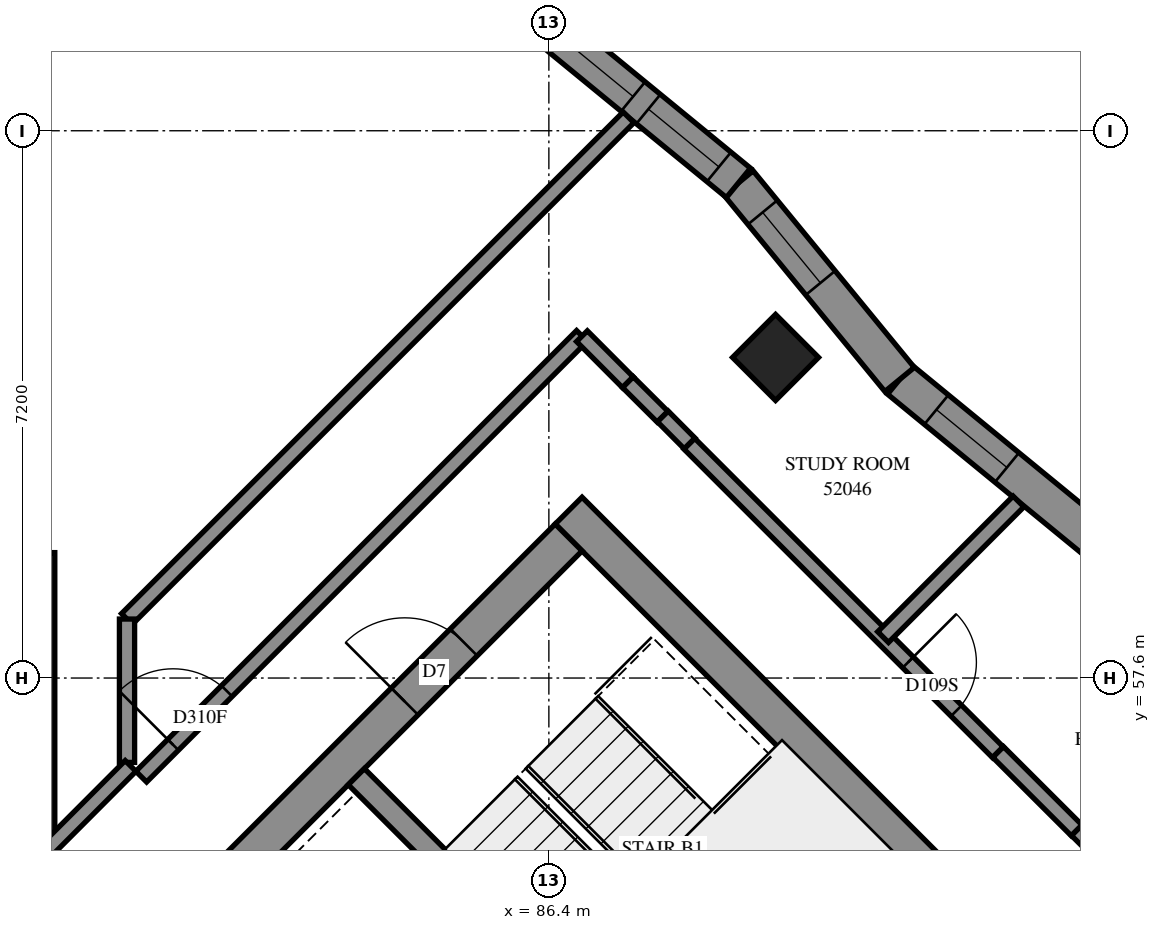
"""IFC4 building model, lengths in metres.
Left out: names, types, materials, properties, quantities, classifications, styles, units other than length and angle.
Written with IfcOpenShell. Run it as: python <this file> out.ifc"""

import sys

from ifc_helpers import new_model, si_unit, direction, frame, frame_2d, origin, origin_2d, place, context, subcontext, project, spatial, polyline, rectangle, outline, extrude, element, fill, save


model = new_model("IFC4")
c1 = context("Model", 3, precision=1e-05, world=origin(), true_north=direction((0.0, 1.0)))
c2 = subcontext(c1, "Body", "Model", "MODEL_VIEW")
j1 = project(units=[si_unit("LENGTHUNIT", "METRE"), si_unit("PLANEANGLEUNIT", "RADIAN")], contexts=[c1])
p1 = place(None, origin())
s1 = spatial("IfcSite", under=j1, at=p1, CompositionType="ELEMENT")
p2 = place(p1, origin())
s2 = spatial("IfcBuilding", under=s1, at=p2, CompositionType="ELEMENT")
p3 = place(p2, frame((0.0, 0.0, 193.0)))
s3 = spatial("IfcBuildingStorey", under=s2, at=p3, CompositionType="ELEMENT", Elevation=193.0)
p4 = place(p3, frame((89.382, 61.818, 0.0), z_axis=(0.0, 0.0, 1.0), x_axis=(0.7071067812, -0.7071067812, 0.0)))
e1 = element("IfcColumn", 1, at=p4, inside=s3, PredefinedType="COLUMN", context=c2, shape_type="SweptSolid", body=[
    extrude(rectangle(XDim=0.8, YDim=0.8, at=origin_2d()), origin(), (0.0, 0.0, 1.0), 3.1),
])
p5 = place(p3, frame((86.66, 59.802, -0.3), z_axis=(0.0, 0.0, 1.0), x_axis=(0.7071067812, -0.7071067812, 0.0)))
e2 = element("IfcWall", 2, at=p5, inside=s3, PredefinedType="SHEAR", context=c2, shape_type="SweptSolid", body=[
    extrude(rectangle(XDim=15.4, YDim=0.5, at=frame_2d((7.7, 0.0))), origin(), (0.0, 0.0, 1.0), 2.7),
])
p6 = place(p5, frame((10.5, 0.0, 0.3)))
e3 = element("IfcOpeningElement", 3, at=p6, cuts=e2, PredefinedType="OPENING", context=c2, shape_type="SweptSolid", body=[
    extrude(rectangle(XDim=0.8, YDim=2.1, at=frame_2d((0.4, 1.05))), frame((0.0, 0.26, 0.0), z_axis=(0.0, -1.0, 0.0), x_axis=(1.0, 0.0, 0.0)), (0.0, 0.0, 1.0), 0.52),
])
p7 = place(p3, frame((76.478, 49.267, -0.3), z_axis=(0.0, 0.0, 1.0), x_axis=(0.7071067812, 0.7071067812, 0.0)))
e4 = element("IfcWall", 4, at=p7, inside=s3, PredefinedType="SHEAR", context=c2, shape_type="SweptSolid", body=[
    extrude(rectangle(XDim=14.4, YDim=0.5, at=frame_2d((7.2, 0.0))), origin(), (0.0, 0.0, 1.0), 2.7),
])
p8 = place(p7, frame((4.55, 0.0, 0.3)))
e5 = element("IfcOpeningElement", 5, at=p8, cuts=e4, PredefinedType="OPENING", context=c2, shape_type="SweptSolid", body=[
    extrude(rectangle(XDim=1.1, YDim=2.1, at=frame_2d((0.55, 1.05))), frame((0.0, 0.26, 0.0), z_axis=(0.0, -1.0, 0.0), x_axis=(1.0, 0.0, 0.0)), (0.0, 0.0, 1.0), 0.52),
])
p9 = place(p7, frame((11.35, 0.0, 0.3)))
e6 = element("IfcOpeningElement", 6, at=p9, cuts=e4, PredefinedType="OPENING", context=c2, shape_type="SweptSolid", body=[
    extrude(rectangle(XDim=1.1, YDim=2.1, at=frame_2d((0.55, 1.05))), frame((0.0, 0.26, 0.0), z_axis=(0.0, -1.0, 0.0), x_axis=(1.0, 0.0, 0.0)), (0.0, 0.0, 1.0), 0.52),
])
p10 = place(p3, frame((83.867, 56.302, 0.0), z_axis=(0.0, 0.0, 1.0), x_axis=(0.7071137256, -0.7070998367, 0.0)))
e7 = element("IfcWall", 7, at=p10, inside=s3, PredefinedType="SOLIDWALL", context=c2, shape_type="SweptSolid", body=[
    extrude(rectangle(XDim=7.2, YDim=0.3, at=frame_2d((3.6, 0.0))), origin(), (0.0, 0.0, 1.0), 3.1),
])
p11 = place(p3, frame((93.601, 59.408, 0.0), z_axis=(0.0, 0.0, 1.0), x_axis=(-0.7734255065, 0.6338872028, 0.0)))
e8 = element("IfcWall", 8, at=p11, inside=s3, PredefinedType="SOLIDWALL", context=c2, shape_type="SweptSolid", body=[
    extrude(outline(polyline([(-0.025, -0.25), (3.32, -0.25), (3.369, 0.25), (0.025, 0.25), (-0.025, -0.25)])), origin(), (0.0, 0.0, 1.0), 3.1),
])
p12 = place(p11, frame((1.518, 0.0, 0.45)))
e9 = element("IfcOpeningElement", 9, at=p12, cuts=e8, PredefinedType="OPENING", context=c2, shape_type="SweptSolid", body=[
    extrude(rectangle(XDim=1.2, YDim=2.5, at=frame_2d((0.6, 1.25))), frame((0.0, 0.26, 0.0), z_axis=(0.0, -1.0, 0.0), x_axis=(1.0, 0.0, 0.0)), (0.0, 0.0, 1.0), 0.52),
])
p13 = place(p3, frame((91.014, 61.528, 0.0), z_axis=(0.0, 0.0, 1.0), x_axis=(-0.6338872028, 0.7734255065, 0.0)))
e10 = element("IfcWall", 10, at=p13, inside=s3, PredefinedType="SOLIDWALL", context=c2, shape_type="SweptSolid", body=[
    extrude(outline(polyline([(0.025, -0.25), (3.369, -0.25), (3.32, 0.25), (-0.025, 0.25), (0.025, -0.25)])), origin(), (0.0, 0.0, 1.0), 3.1),
])
p14 = place(p13, frame((1.643, 0.0, 0.45)))
e11 = element("IfcOpeningElement", 11, at=p14, cuts=e10, PredefinedType="OPENING", context=c2, shape_type="SweptSolid", body=[
    extrude(rectangle(XDim=1.2, YDim=2.5, at=frame_2d((0.6, 1.25))), frame((0.0, 0.26, 0.0), z_axis=(0.0, -1.0, 0.0), x_axis=(1.0, 0.0, 0.0)), (0.0, 0.0, 1.0), 0.52),
])
p15 = place(p3, frame((88.894, 64.115, 0.0), z_axis=(0.0, 0.0, 1.0), x_axis=(-0.7734281512, 0.6338839759, 0.0)))
e12 = element("IfcWall", 12, at=p15, inside=s3, PredefinedType="SOLIDWALL", context=c2, shape_type="SweptSolid", body=[
    extrude(outline(polyline([(-0.025, -0.25), (3.32, -0.25), (3.369, 0.25), (0.025, 0.25), (-0.025, -0.25)])), origin(), (0.0, 0.0, 1.0), 3.1),
])
p16 = place(p15, frame((0.332, 0.0, 0.45)))
e13 = element("IfcOpeningElement", 13, at=p16, cuts=e12, PredefinedType="OPENING", context=c2, shape_type="SweptSolid", body=[
    extrude(rectangle(XDim=1.2, YDim=2.5, at=frame_2d((0.6, 1.25))), frame((0.0, 0.26, 0.0), z_axis=(0.0, -1.0, 0.0), x_axis=(1.0, 0.0, 0.0)), (0.0, 0.0, 1.0), 0.52),
])
p17 = place(p15, frame((1.792, 0.0, 0.45)))
e14 = element("IfcOpeningElement", 14, at=p17, cuts=e12, PredefinedType="OPENING", context=c2, shape_type="SweptSolid", body=[
    extrude(rectangle(XDim=1.2, YDim=2.5, at=frame_2d((0.6, 1.25))), frame((0.0, 0.26, 0.0), z_axis=(0.0, -1.0, 0.0), x_axis=(1.0, 0.0, 0.0)), (0.0, 0.0, 1.0), 0.52),
])
p18 = place(p3, frame((80.849, 58.377, 0.0), z_axis=(0.0, 0.0, 1.0), x_axis=(0.7071067812, 0.7071067812, 0.0)))
e15 = element("IfcWall", 15, at=p18, inside=s3, PredefinedType="PARTITIONING", context=c2, shape_type="SweptSolid", body=[
    extrude(rectangle(XDim=9.333, YDim=0.2, at=frame_2d((4.666, 0.0))), origin(), (0.0, 0.0, 1.0), 3.1),
])
p19 = place(p3, frame((93.346, 55.599, 0.0), z_axis=(0.0, 0.0, 1.0), x_axis=(0.7071067812, -0.7071067812, 0.0)))
e16 = element("IfcWall", 16, at=p19, inside=s3, PredefinedType="PARTITIONING", context=c2, shape_type="SweptSolid", body=[
    extrude(rectangle(XDim=9.201, YDim=0.2, at=frame_2d((4.601, 0.0))), origin(), (0.0, 0.0, 1.0), 3.1),
])
p20 = place(p3, frame((81.037, 56.303, 0.0), z_axis=(0.0, 0.0, 1.0), x_axis=(0.7071067812, 0.7071067812, 0.0)))
e17 = element("IfcWall", 17, at=p20, inside=s3, PredefinedType="PARTITIONING", context=c2, shape_type="SweptSolid", body=[
    extrude(rectangle(XDim=8.2, YDim=0.2, at=frame_2d((4.1, 0.0))), origin(), (0.0, 0.0, 1.0), 3.1),
])
p21 = place(p20, frame((0.592, 0.0, 0.0)))
e18 = element("IfcOpeningElement", 18, at=p21, cuts=e17, PredefinedType="OPENING", context=c2, shape_type="SweptSolid", body=[
    extrude(rectangle(XDim=1.0, YDim=2.1, at=frame_2d((0.5, 1.05))), frame((0.0, 0.11, 0.0), z_axis=(0.0, -1.0, 0.0), x_axis=(1.0, 0.0, 0.0)), (0.0, 0.0, 1.0), 0.22),
])
p22 = place(p3, frame((88.247, 60.683, 0.0), z_axis=(0.0, 0.0, 1.0), x_axis=(0.7071067812, -0.7071067812, 0.0)))
e19 = element("IfcWall", 19, at=p22, inside=s3, PredefinedType="PARTITIONING", context=c2, shape_type="SweptSolid", body=[
    extrude(rectangle(XDim=5.742, YDim=0.2, at=frame_2d((2.871, 0.0))), origin(), (0.0, 0.0, 1.0), 3.1),
])
p23 = place(p22, frame((4.069, 0.0, 0.0)))
e20 = element("IfcOpeningElement", 20, at=p23, cuts=e19, PredefinedType="OPENING", context=c2, shape_type="SweptSolid", body=[
    extrude(rectangle(XDim=0.9, YDim=2.1, at=frame_2d((0.45, 1.05))), frame((0.0, 0.11, 0.0), z_axis=(0.0, -1.0, 0.0), x_axis=(1.0, 0.0, 0.0)), (0.0, 0.0, 1.0), 0.22),
])
p24 = place(p3, frame((79.8, 55.35, 0.0), z_axis=(0.0, 0.0, 1.0), x_axis=(0.0, 1.0, 0.0)))
e21 = element("IfcWall", 21, at=p24, inside=s3, PredefinedType="PARTITIONING", context=c2, shape_type="SweptSolid", body=[
    extrude(rectangle(XDim=3.9, YDim=0.2, at=frame_2d((1.95, 0.0))), origin(), (0.0, 0.0, 1.0), 3.1),
])
p25 = place(p3, frame((90.797, 58.139, 0.0), z_axis=(0.0, 0.0, 1.0), x_axis=(0.7066702589, 0.7075430342, 0.0)))
e22 = element("IfcWall", 22, at=p25, inside=s3, PredefinedType="PARTITIONING", context=c2, shape_type="SweptSolid", body=[
    extrude(rectangle(XDim=2.521, YDim=0.2, at=frame_2d((1.26, 0.0))), origin(), (0.0, 0.0, 1.0), 3.1),
])
p26 = place(p3, frame((80.85, 56.49, 0.0), z_axis=(0.0, 0.0, 1.0), x_axis=(0.0, 1.0, 0.0)))
e23 = element("IfcWall", 23, at=p26, inside=s3, PredefinedType="PARTITIONING", context=c2, shape_type="SweptSolid", body=[
    extrude(rectangle(XDim=1.886, YDim=0.2, at=frame_2d((0.943, 0.0))), origin(), (0.0, 0.0, 1.0), 3.1),
])
p27 = place(p3, frame((79.803, 55.347, 0.0), z_axis=(0.0, 0.0, 1.0), x_axis=(0.706460727, 0.7077522457, 0.0)))
e24 = element("IfcWall", 24, at=p27, inside=s3, PredefinedType="PARTITIONING", context=c2, shape_type="SweptSolid", body=[
    extrude(rectangle(XDim=1.549, YDim=0.2, at=frame_2d((0.774, 0.0))), origin(), (0.0, 0.0, 1.0), 3.1),
])
p28 = place(p3, frame((92.311, 56.627, 0.0), z_axis=(0.0, 0.0, 1.0), x_axis=(0.7077922938, -0.7064206033, 0.0)))
e25 = element("IfcWall", 25, at=p28, inside=s3, PredefinedType="PARTITIONING", context=c2, shape_type="SweptSolid", body=[
    extrude(rectangle(XDim=1.458, YDim=0.2, at=frame_2d((0.729, 0.0))), origin(), (0.0, 0.0, 1.0), 3.1),
])
p29 = place(p3, frame((86.835, 62.097, 0.0), z_axis=(0.0, 0.0, 1.0), x_axis=(0.7059370453, -0.7082745852, 0.0)))
e26 = element("IfcWall", 26, at=p29, inside=s3, PredefinedType="PARTITIONING", context=c2, shape_type="SweptSolid", body=[
    extrude(rectangle(XDim=0.856, YDim=0.2, at=frame_2d((0.428, 0.0))), origin(), (0.0, 0.0, 1.0), 3.1),
])
p30 = place(p3, frame((87.44, 61.492, 0.0), z_axis=(0.0, 0.0, 1.0), x_axis=(0.7086591505, -0.7055509963, 0.0)))
e27 = element("IfcWall", 27, at=p30, inside=s3, PredefinedType="PARTITIONING", context=c2, shape_type="SweptSolid", body=[
    extrude(rectangle(XDim=0.643, YDim=0.2, at=frame_2d((0.322, 0.0))), origin(), (0.0, 0.0, 1.0), 3.1),
])
p31 = place(p3, frame((87.899, 61.041, 0.0), z_axis=(0.0, 0.0, 1.0), x_axis=(0.7051008166, -0.7091070712, 0.0)))
e28 = element("IfcWall", 28, at=p31, inside=s3, PredefinedType="PARTITIONING", context=c2, shape_type="SweptSolid", body=[
    extrude(rectangle(XDim=0.499, YDim=0.2, at=frame_2d((0.25, 0.0))), origin(), (0.0, 0.0, 1.0), 3.1),
])
p32 = place(p12, origin())
e29 = element("IfcWindow", 29, at=p32, inside=s3, PartitioningType="SINGLE_PANEL", PredefinedType="WINDOW", context=c2, shape_type="SweptSolid", body=[
    extrude(rectangle(XDim=1.2, YDim=2.5, at=frame_2d((0.6, 1.25))), frame((0.0, 0.18, 0.0), z_axis=(0.0, -1.0, 0.0), x_axis=(1.0, 0.0, 0.0)), (0.0, 0.0, 1.0), 0.06),
])
fill(e9, e29)
p33 = place(p14, origin())
e30 = element("IfcWindow", 30, at=p33, inside=s3, PartitioningType="SINGLE_PANEL", PredefinedType="WINDOW", context=c2, shape_type="SweptSolid", body=[
    extrude(rectangle(XDim=1.2, YDim=2.5, at=frame_2d((0.6, 1.25))), frame((0.0, 0.18, 0.0), z_axis=(0.0, -1.0, 0.0), x_axis=(1.0, 0.0, 0.0)), (0.0, 0.0, 1.0), 0.06),
])
fill(e11, e30)
p34 = place(p16, origin())
e31 = element("IfcWindow", 31, at=p34, inside=s3, PartitioningType="SINGLE_PANEL", PredefinedType="WINDOW", context=c2, shape_type="SweptSolid", body=[
    extrude(rectangle(XDim=1.2, YDim=2.5, at=frame_2d((0.6, 1.25))), frame((0.0, 0.18, 0.0), z_axis=(0.0, -1.0, 0.0), x_axis=(1.0, 0.0, 0.0)), (0.0, 0.0, 1.0), 0.06),
])
fill(e13, e31)
p35 = place(p17, origin())
e32 = element("IfcWindow", 32, at=p35, inside=s3, PartitioningType="SINGLE_PANEL", PredefinedType="WINDOW", context=c2, shape_type="SweptSolid", body=[
    extrude(rectangle(XDim=1.2, YDim=2.5, at=frame_2d((0.6, 1.25))), frame((0.0, 0.18, 0.0), z_axis=(0.0, -1.0, 0.0), x_axis=(1.0, 0.0, 0.0)), (0.0, 0.0, 1.0), 0.06),
])
fill(e14, e32)
p36 = place(p9, origin())
e33 = element("IfcDoor", 33, at=p36, inside=s3, OperationType="SINGLE_SWING_LEFT", PredefinedType="DOOR", context=c2, shape_type="SweptSolid", body=[
    extrude(rectangle(XDim=1.1, YDim=2.1, at=frame_2d((0.55, 1.05))), frame((0.0, 0.025, 0.0), z_axis=(0.0, -1.0, 0.0), x_axis=(1.0, 0.0, 0.0)), (0.0, 0.0, 1.0), 0.05),
])
fill(e6, e33)
p37 = place(p21, origin())
e34 = element("IfcDoor", 34, at=p37, inside=s3, OperationType="SINGLE_SWING_RIGHT", PredefinedType="DOOR", context=c2, shape_type="SweptSolid", body=[
    extrude(rectangle(XDim=1.0, YDim=2.1, at=frame_2d((0.5, 1.05))), frame((0.0, 0.025, 0.0), z_axis=(0.0, -1.0, 0.0), x_axis=(1.0, 0.0, 0.0)), (0.0, 0.0, 1.0), 0.05),
])
fill(e18, e34)
p38 = place(p23, origin())
e35 = element("IfcDoor", 35, at=p38, inside=s3, OperationType="SINGLE_SWING_RIGHT", PredefinedType="DOOR", context=c2, shape_type="SweptSolid", body=[
    extrude(rectangle(XDim=0.9, YDim=2.1, at=frame_2d((0.45, 1.05))), frame((0.0, 0.025, 0.0), z_axis=(0.0, -1.0, 0.0), x_axis=(1.0, 0.0, 0.0)), (0.0, 0.0, 1.0), 0.05),
])
fill(e20, e35)
save(model, sys.argv[1])
